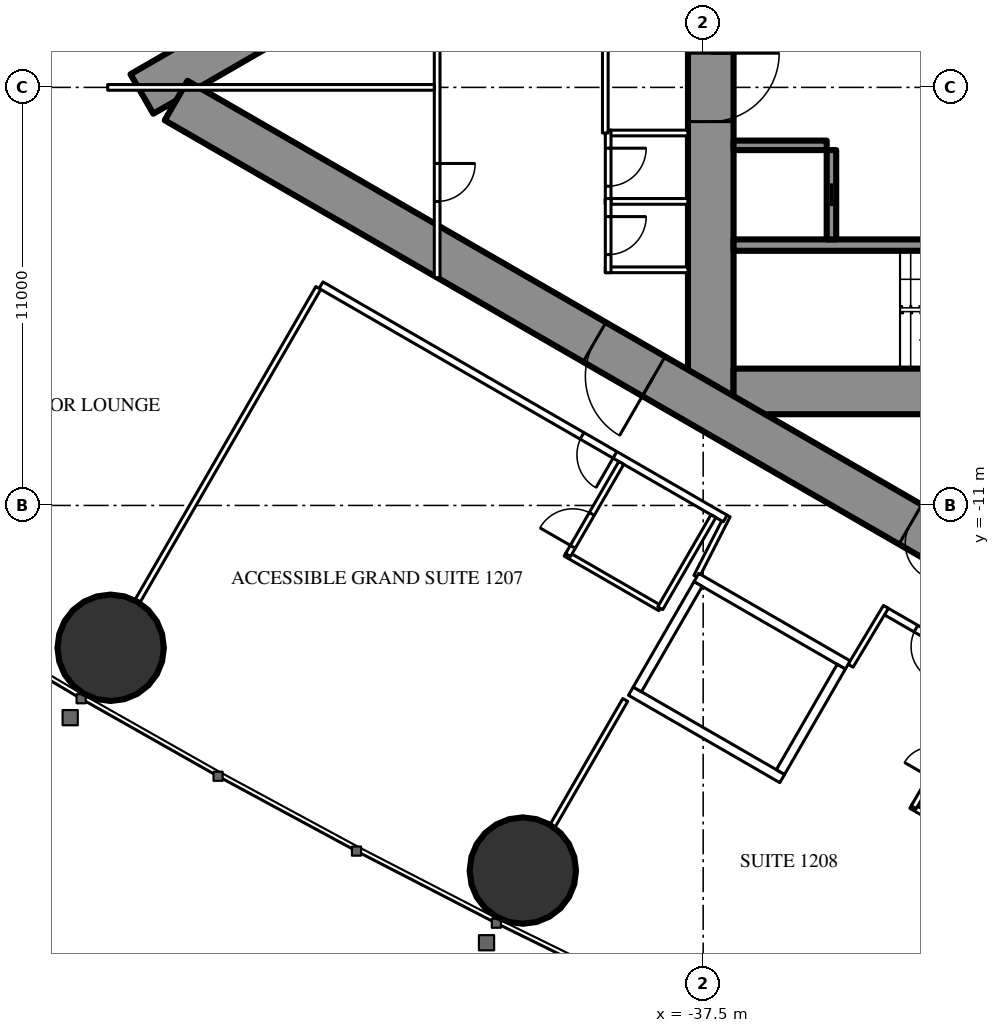
"""IFC4 building model, lengths in metres.
Left out: names, types, materials, properties, quantities, classifications, styles, units other than length and angle.
Written with IfcOpenShell. Run it as: python <this file> out.ifc"""

import sys

from ifc_helpers import new_model, si_unit, direction, frame, frame_2d, origin, origin_2d, place, context, subcontext, project, spatial, rectangle, hollow_circle, extrude, element, fill, save


model = new_model("IFC4")
c1 = context("Model", 3, precision=1e-05, world=origin(), true_north=direction((0.0, 1.0)))
c2 = subcontext(c1, "Body", "Model", "MODEL_VIEW")
j1 = project(units=[si_unit("LENGTHUNIT", "METRE"), si_unit("PLANEANGLEUNIT", "RADIAN")], contexts=[c1])
p1 = place(None, origin())
s1 = spatial("IfcSite", under=j1, at=p1, CompositionType="ELEMENT")
p2 = place(p1, origin())
s2 = spatial("IfcBuilding", under=s1, at=p2, CompositionType="ELEMENT")
p3 = place(p2, frame((0.0, 0.0, 49.5)))
s3 = spatial("IfcBuildingStorey", under=s2, at=p3, CompositionType="ELEMENT", Elevation=49.5)
for number, where, z_axis, x_axis in (
    (1, (-53.09, -14.745, 0.0), (0.0, 0.0, 1.0), (1.0, 0.0, 0.0)),
    (2, (-42.245, -20.607, 0.0), (0.0, 0.0, 1.0), (1.0, 0.0, 0.0)),
):
    element("IfcColumn", number, at=place(p3, frame(where, z_axis=z_axis, x_axis=x_axis)), inside=s3, PredefinedType="COLUMN", context=c2, shape_type="SweptSolid", body=[
        extrude(hollow_circle(Radius=1.4, WallThickness=0.12, at=origin_2d()), origin(), (0.0, 0.0, 1.0), 3.5),
    ])
p4 = place(p3, frame((-37.3, 8.6, 0.0), z_axis=(0.0, 0.0, 1.0), x_axis=(0.0, -1.0, 0.0)))
e3 = element("IfcWall", 3, at=p4, inside=s3, PredefinedType="SHEAR", context=c2, shape_type="SweptSolid", body=[
    extrude(rectangle(XDim=17.2, YDim=1.2, at=frame_2d((8.6, 0.0))), origin(), (0.0, 0.0, 1.0), 3.5),
])
p5 = place(p4, frame((7.7, 0.0, 0.0)))
e4 = element("IfcOpeningElement", 4, at=p5, cuts=e3, PredefinedType="OPENING", context=c2, shape_type="SweptSolid", body=[
    extrude(rectangle(XDim=1.8, YDim=2.2, at=frame_2d((0.9, 1.1))), frame((0.0, 0.61, 0.0), z_axis=(0.0, -1.0, 0.0), x_axis=(1.0, 0.0, 0.0)), (0.0, 0.0, 1.0), 1.22),
])
p6 = place(p3, frame((-28.3, -8.0, 0.0), z_axis=(0.0, 0.0, 1.0), x_axis=(-1.0, 0.0, 0.0)))
e5 = element("IfcWall", 5, at=p6, inside=s3, PredefinedType="SHEAR", context=c2, shape_type="SweptSolid", body=[
    extrude(rectangle(XDim=8.4, YDim=1.2, at=frame_2d((4.2, 0.0))), origin(), (0.0, 0.0, 1.0), 3.5),
])
p7 = place(p6, frame((0.25, 0.0, 0.0)))
e6 = element("IfcOpeningElement", 6, at=p7, cuts=e5, PredefinedType="OPENING", context=c2, shape_type="SweptSolid", body=[
    extrude(rectangle(XDim=1.0, YDim=2.2, at=frame_2d((0.5, 1.1))), frame((0.0, 0.61, 0.0), z_axis=(0.0, -1.0, 0.0), x_axis=(1.0, 0.0, 0.0)), (0.0, 0.0, 1.0), 1.22),
])
p8 = place(p3, frame((-28.3, -4.15, 0.0), z_axis=(0.0, 0.0, 1.0), x_axis=(-1.0, 0.0, 0.0)))
e7 = element("IfcWall", 7, at=p8, inside=s3, PredefinedType="SHEAR", context=c2, shape_type="SweptSolid", body=[
    extrude(rectangle(XDim=8.4, YDim=0.3, at=frame_2d((4.2, 0.0))), origin(), (0.0, 0.0, 1.0), 3.5),
])
p9 = place(p3, frame((-34.125, -1.65, 0.0), z_axis=(0.0, 0.0, 1.0), x_axis=(0.0, -1.0, 0.0)))
e8 = element("IfcWall", 8, at=p9, inside=s3, PredefinedType="SHEAR", context=c2, shape_type="SweptSolid", body=[
    extrude(rectangle(XDim=2.35, YDim=0.25, at=frame_2d((1.175, 0.0))), origin(), (0.0, 0.0, 1.0), 3.5),
])
p10 = place(p9, frame((0.875, 0.0, 0.0)))
e9 = element("IfcOpeningElement", 9, at=p10, cuts=e8, PredefinedType="OPENING", context=c2, shape_type="SweptSolid", body=[
    extrude(rectangle(XDim=0.6, YDim=2.0, at=frame_2d((0.3, 1.0))), frame((0.0, 0.135, 0.0), z_axis=(0.0, -1.0, 0.0), x_axis=(1.0, 0.0, 0.0)), (0.0, 0.0, 1.0), 0.27),
])
p11 = place(p3, frame((-34.25, -1.525, 0.0), z_axis=(0.0, 0.0, 1.0), x_axis=(-1.0, 0.0, 0.0)))
e10 = element("IfcWall", 10, at=p11, inside=s3, PredefinedType="SHEAR", context=c2, shape_type="SweptSolid", body=[
    extrude(rectangle(XDim=2.45, YDim=0.25, at=frame_2d((1.225, 0.0))), origin(), (0.0, 0.0, 1.0), 3.5),
])
p12 = place(p3, frame((-27.2, 14.3, 0.0), z_axis=(0.0, 0.0, 1.0), x_axis=(-0.866026593062, -0.499997940104, 0.0)))
e11 = element("IfcWall", 11, at=p12, inside=s3, PredefinedType="SHEAR", context=c2, shape_type="SweptSolid", body=[
    extrude(rectangle(XDim=28.946, YDim=1.2, at=frame_2d((14.473, 0.0))), origin(), (0.0, 0.0, 1.0), 3.5),
])
p13 = place(p12, frame((4.6, 0.0, 0.0)))
e12 = element("IfcOpeningElement", 12, at=p13, cuts=e11, PredefinedType="OPENING", context=c2, shape_type="SweptSolid", body=[
    extrude(rectangle(XDim=1.0, YDim=2.2, at=frame_2d((0.5, 1.1))), frame((0.0, 0.61, 0.0), z_axis=(0.0, -1.0, 0.0), x_axis=(1.0, 0.0, 0.0)), (0.0, 0.0, 1.0), 1.22),
])
p14 = place(p12, frame((13.395, 0.0, 0.0)))
e13 = element("IfcOpeningElement", 13, at=p14, cuts=e11, PredefinedType="OPENING", context=c2, shape_type="SweptSolid", body=[
    extrude(rectangle(XDim=1.8, YDim=2.2, at=frame_2d((0.9, 1.1))), frame((0.0, 0.61, 0.0), z_axis=(0.0, -1.0, 0.0), x_axis=(1.0, 0.0, 0.0)), (0.0, 0.0, 1.0), 1.22),
])
p15 = place(p3, frame((-27.2, -14.3, 0.0), z_axis=(0.0, 0.0, 1.0), x_axis=(-0.866024021859, 0.500002393557, 0.0)))
e14 = element("IfcWall", 14, at=p15, inside=s3, PredefinedType="SHEAR", context=c2, shape_type="SweptSolid", body=[
    extrude(rectangle(XDim=27.907, YDim=1.2, at=frame_2d((13.954, 0.0))), origin(), (0.0, 0.0, 1.0), 3.5),
])
p16 = place(p15, frame((4.6, 0.0, 0.0)))
e15 = element("IfcOpeningElement", 15, at=p16, cuts=e14, PredefinedType="OPENING", context=c2, shape_type="SweptSolid", body=[
    extrude(rectangle(XDim=1.0, YDim=2.2, at=frame_2d((0.5, 1.1))), frame((0.0, 0.61, 0.0), z_axis=(0.0, -1.0, 0.0), x_axis=(1.0, 0.0, 0.0)), (0.0, 0.0, 1.0), 1.22),
])
p17 = place(p15, frame((13.395, 0.0, 0.0)))
e16 = element("IfcOpeningElement", 16, at=p17, cuts=e14, PredefinedType="OPENING", context=c2, shape_type="SweptSolid", body=[
    extrude(rectangle(XDim=1.8, YDim=2.2, at=frame_2d((0.9, 1.1))), frame((0.0, 0.61, 0.0), z_axis=(0.0, -1.0, 0.0), x_axis=(1.0, 0.0, 0.0)), (0.0, 0.0, 1.0), 1.22),
])
p18 = place(p3, frame((-47.627, -5.278, 0.0), z_axis=(0.0, 0.0, 1.0), x_axis=(-0.500009844318, -0.86601972009, 0.0)))
e17 = element("IfcWall", 17, at=p18, inside=s3, PredefinedType="PARTITIONING", context=c2, shape_type="SweptSolid", body=[
    extrude(rectangle(XDim=9.51, YDim=0.15, at=frame_2d((4.755, 0.0))), origin(), (0.0, 0.0, 1.0), 2.25),
])
p19 = place(p3, frame((-39.551, -16.118, 0.0), z_axis=(0.0, 0.0, 1.0), x_axis=(-0.499986503906, -0.866033195618, 0.0)))
e18 = element("IfcWall", 18, at=p19, inside=s3, PredefinedType="PARTITIONING", context=c2, shape_type="SweptSolid", body=[
    extrude(rectangle(XDim=3.815, YDim=0.15, at=frame_2d((1.907, 0.0))), origin(), (0.0, 0.0, 1.0), 3.25),
])
p20 = place(p3, frame((-37.7, 10.894, 0.0), z_axis=(0.0, 0.0, 1.0), x_axis=(-0.866027905338, -0.499995667157, 0.0)))
e19 = element("IfcWall", 19, at=p20, inside=s3, PredefinedType="PARTITIONING", context=c2, shape_type="SweptSolid", body=[
    extrude(rectangle(XDim=21.787, YDim=0.2, at=frame_2d((10.894, 0.0))), origin(), (0.0, 0.0, 1.0), 3.25),
])
p21 = place(p20, frame((20.237, 0.0, 0.0)))
e20 = element("IfcOpeningElement", 20, at=p21, cuts=e19, PredefinedType="OPENING", context=c2, shape_type="SweptSolid", body=[
    extrude(rectangle(XDim=0.95, YDim=2.2, at=frame_2d((0.475, 1.1))), frame((0.0, 0.11, 0.0), z_axis=(0.0, -1.0, 0.0), x_axis=(1.0, 0.0, 0.0)), (0.0, 0.0, 1.0), 0.22),
])
p22 = place(p20, frame((2.95, 0.0, 0.0)))
e21 = element("IfcOpeningElement", 21, at=p22, cuts=e19, PredefinedType="OPENING", context=c2, shape_type="SweptSolid", body=[
    extrude(rectangle(XDim=0.95, YDim=2.2, at=frame_2d((0.475, 1.1))), frame((0.0, 0.11, 0.0), z_axis=(0.0, -1.0, 0.0), x_axis=(1.0, 0.0, 0.0)), (0.0, 0.0, 1.0), 0.22),
])
p23 = place(p3, frame((-27.572, -16.741, 0.0), z_axis=(0.0, 0.0, 1.0), x_axis=(-0.866024464444, 0.500001626982, 0.0)))
e22 = element("IfcWall", 22, at=p23, inside=s3, PredefinedType="PARTITIONING", context=c2, shape_type="SweptSolid", body=[
    extrude(rectangle(XDim=5.955, YDim=0.2, at=frame_2d((2.978, 0.0))), origin(), (0.0, 0.0, 1.0), 3.25),
])
p24 = place(p23, frame((4.05, 0.0, 0.0)))
e23 = element("IfcOpeningElement", 23, at=p24, cuts=e22, PredefinedType="OPENING", context=c2, shape_type="SweptSolid", body=[
    extrude(rectangle(XDim=0.95, YDim=2.2, at=frame_2d((0.475, 1.1))), frame((0.0, 0.11, 0.0), z_axis=(0.0, -1.0, 0.0), x_axis=(1.0, 0.0, 0.0)), (0.0, 0.0, 1.0), 0.22),
])
p25 = place(p3, frame((-36.857, -11.265, 0.0), z_axis=(0.0, 0.0, 1.0), x_axis=(-0.454225294761, -0.890886851176, 0.0)))
e24 = element("IfcWall", 24, at=p25, inside=s3, PredefinedType="PARTITIONING", context=c2, shape_type="SweptSolid", body=[
    extrude(rectangle(XDim=1.807, YDim=0.15, at=frame_2d((0.904, 0.0))), origin(), (0.0, 0.0, 1.0), 3.25),
])
p26 = place(p3, frame((-33.621, -15.218, 0.0), z_axis=(0.0, 0.0, 1.0), x_axis=(0.514336634837, 0.857588377991, 0.0)))
e25 = element("IfcWall", 25, at=p26, inside=s3, PredefinedType="PARTITIONING", context=c2, shape_type="SweptSolid", body=[
    extrude(rectangle(XDim=1.805, YDim=0.15, at=frame_2d((0.903, 0.0))), origin(), (0.0, 0.0, 1.0), 3.25),
])
p27 = place(p3, frame((-36.92, -11.344, 0.0), z_axis=(0.0, 0.0, 1.0), x_axis=(-0.866025017052, 0.500000669839, 0.0)))
e26 = element("IfcWall", 26, at=p27, inside=s3, PredefinedType="PARTITIONING", context=c2, shape_type="SweptSolid", body=[
    extrude(rectangle(XDim=12.28, YDim=0.2, at=frame_2d((6.14, 0.0))), origin(), (0.0, 0.0, 1.0), 3.25),
])
p28 = place(p27, frame((3.35, 0.0, 0.0)))
e27 = element("IfcOpeningElement", 27, at=p28, cuts=e26, PredefinedType="OPENING", context=c2, shape_type="SweptSolid", body=[
    extrude(rectangle(XDim=1.0, YDim=2.2, at=frame_2d((0.5, 1.1))), frame((0.0, 0.11, 0.0), z_axis=(0.0, -1.0, 0.0), x_axis=(1.0, 0.0, 0.0)), (0.0, 0.0, 1.0), 0.22),
])
p29 = place(p3, frame((-38.63, -13.705, 0.0), z_axis=(0.0, 0.0, 1.0), x_axis=(-0.866018712932, 0.500011588718, 0.0)))
e28 = element("IfcWall", 28, at=p29, inside=s3, PredefinedType="PARTITIONING", context=c2, shape_type="SweptSolid", body=[
    extrude(rectangle(XDim=2.875, YDim=0.15, at=frame_2d((1.438, 0.0))), origin(), (0.0, 0.0, 1.0), 3.25),
])
p30 = place(p3, frame((-39.655, -9.88, 0.0), z_axis=(0.0, 0.0, 1.0), x_axis=(-0.500049511043, -0.865996816683, 0.0)))
e29 = element("IfcWall", 29, at=p30, inside=s3, PredefinedType="PARTITIONING", context=c2, shape_type="SweptSolid", body=[
    extrude(rectangle(XDim=2.8, YDim=0.15, at=frame_2d((1.4, 0.0))), origin(), (0.0, 0.0, 1.0), 3.25),
])
p31 = place(p30, frame((1.55, 0.0, 0.0)))
e30 = element("IfcOpeningElement", 30, at=p31, cuts=e29, PredefinedType="OPENING", context=c2, shape_type="SweptSolid", body=[
    extrude(rectangle(XDim=1.0, YDim=2.2, at=frame_2d((0.5, 1.1))), frame((0.0, 0.085, 0.0), z_axis=(0.0, -1.0, 0.0), x_axis=(1.0, 0.0, 0.0)), (0.0, 0.0, 1.0), 0.17),
])
p32 = place(p3, frame((-37.23, -11.281, 0.0), z_axis=(0.0, 0.0, 1.0), x_axis=(-0.500049511043, -0.865996816683, 0.0)))
e31 = element("IfcWall", 31, at=p32, inside=s3, PredefinedType="PARTITIONING", context=c2, shape_type="SweptSolid", body=[
    extrude(rectangle(XDim=2.8, YDim=0.15, at=frame_2d((1.4, 0.0))), origin(), (0.0, 0.0, 1.0), 3.25),
])
p33 = place(p3, frame((-29.882, -20.142, 0.0), z_axis=(0.0, 0.0, 1.0), x_axis=(-0.866031185235, 0.4999899861, 0.0)))
e32 = element("IfcWall", 32, at=p33, inside=s3, PredefinedType="PARTITIONING", context=c2, shape_type="SweptSolid", body=[
    extrude(rectangle(XDim=2.475, YDim=0.15, at=frame_2d((1.238, 0.0))), origin(), (0.0, 0.0, 1.0), 3.25),
])
p34 = place(p3, frame((-30.66, -16.69, 0.0), z_axis=(0.0, 0.0, 1.0), x_axis=(-0.499936506574, -0.866062058628, 0.0)))
e33 = element("IfcWall", 33, at=p34, inside=s3, PredefinedType="PARTITIONING", context=c2, shape_type="SweptSolid", body=[
    extrude(rectangle(XDim=2.6, YDim=0.15, at=frame_2d((1.3, 0.0))), origin(), (0.0, 0.0, 1.0), 3.25),
])
p35 = place(p34, frame((0.9, 0.0, 0.0)))
e34 = element("IfcOpeningElement", 34, at=p35, cuts=e33, PredefinedType="OPENING", context=c2, shape_type="SweptSolid", body=[
    extrude(rectangle(XDim=0.8, YDim=2.2, at=frame_2d((0.4, 1.1))), frame((0.0, 0.085, 0.0), z_axis=(0.0, -1.0, 0.0), x_axis=(1.0, 0.0, 0.0)), (0.0, 0.0, 1.0), 0.17),
])
for number, where, z_axis, x_axis in (
    (35, (-37.9, -1.2, 0.0), (0.0, 0.0, 1.0), (-1.0, 0.0, 0.0)),
    (36, (-37.9, -3.0, 0.0), (0.0, 0.0, 1.0), (-1.0, 0.0, 0.0)),
    (37, (-37.9, -4.8, 0.0), (0.0, 0.0, 1.0), (-1.0, 0.0, 0.0)),
):
    element("IfcWall", number, at=place(p3, frame(where, z_axis=z_axis, x_axis=x_axis)), inside=s3, PredefinedType="PARTITIONING", context=c2, shape_type="SweptSolid", body=[
        extrude(rectangle(XDim=2.175, YDim=0.15, at=frame_2d((1.087, 0.0))), origin(), (0.0, 0.0, 1.0), 3.25),
    ])
p36 = place(p3, frame((-40.0, -1.125, 0.0), z_axis=(0.0, 0.0, 1.0), x_axis=(0.0, -1.0, 0.0)))
e38 = element("IfcWall", 38, at=p36, inside=s3, PredefinedType="PARTITIONING", context=c2, shape_type="SweptSolid", body=[
    extrude(rectangle(XDim=1.95, YDim=0.15, at=frame_2d((0.975, 0.0))), origin(), (0.0, 0.0, 1.0), 3.25),
])
p37 = place(p36, frame((0.475, 0.0, 0.0)))
e39 = element("IfcOpeningElement", 39, at=p37, cuts=e38, PredefinedType="OPENING", context=c2, shape_type="SweptSolid", body=[
    extrude(rectangle(XDim=1.0, YDim=2.2, at=frame_2d((0.5, 1.1))), frame((0.0, 0.085, 0.0), z_axis=(0.0, -1.0, 0.0), x_axis=(1.0, 0.0, 0.0)), (0.0, 0.0, 1.0), 0.17),
])
p38 = place(p3, frame((-40.0, -2.925, 0.0), z_axis=(0.0, 0.0, 1.0), x_axis=(0.0, -1.0, 0.0)))
e40 = element("IfcWall", 40, at=p38, inside=s3, PredefinedType="PARTITIONING", context=c2, shape_type="SweptSolid", body=[
    extrude(rectangle(XDim=1.95, YDim=0.15, at=frame_2d((0.975, 0.0))), origin(), (0.0, 0.0, 1.0), 3.25),
])
p39 = place(p38, frame((0.475, 0.0, 0.0)))
e41 = element("IfcOpeningElement", 41, at=p39, cuts=e40, PredefinedType="OPENING", context=c2, shape_type="SweptSolid", body=[
    extrude(rectangle(XDim=1.0, YDim=2.2, at=frame_2d((0.5, 1.1))), frame((0.0, 0.085, 0.0), z_axis=(0.0, -1.0, 0.0), x_axis=(1.0, 0.0, 0.0)), (0.0, 0.0, 1.0), 0.17),
])
p40 = place(p3, frame((-40.075, 6.174, 0.0), z_axis=(0.0, 0.0, 1.0), x_axis=(0.0, -1.0, 0.0)))
e42 = element("IfcWall", 42, at=p40, inside=s3, PredefinedType="PARTITIONING", context=c2, shape_type="SweptSolid", body=[
    extrude(rectangle(XDim=7.374, YDim=0.15, at=frame_2d((3.687, 0.0))), origin(), (0.0, 0.0, 1.0), 3.25),
])
p41 = place(p40, frame((2.787, 0.0, 0.0)))
e43 = element("IfcOpeningElement", 43, at=p41, cuts=e42, PredefinedType="OPENING", context=c2, shape_type="SweptSolid", body=[
    extrude(rectangle(XDim=1.8, YDim=2.2, at=frame_2d((0.9, 1.1))), frame((0.0, 0.085, 0.0), z_axis=(0.0, -1.0, 0.0), x_axis=(1.0, 0.0, 0.0)), (0.0, 0.0, 1.0), 0.17),
])
p42 = place(p3, frame((-44.5, 5.005, 0.0), z_axis=(0.0, 0.0, 1.0), x_axis=(0.0, -1.0, 0.0)))
e44 = element("IfcWall", 44, at=p42, inside=s3, PredefinedType="PARTITIONING", context=c2, shape_type="SweptSolid", body=[
    extrude(rectangle(XDim=10.009, YDim=0.15, at=frame_2d((5.005, 0.0))), origin(), (0.0, 0.0, 1.0), 2.45),
])
p43 = place(p42, frame((2.002, 0.0, 0.0)))
e45 = element("IfcOpeningElement", 45, at=p43, cuts=e44, PredefinedType="OPENING", context=c2, shape_type="SweptSolid", body=[
    extrude(rectangle(XDim=1.0, YDim=2.2, at=frame_2d((0.5, 1.1))), frame((0.0, 0.085, 0.0), z_axis=(0.0, -1.0, 0.0), x_axis=(1.0, 0.0, 0.0)), (0.0, 0.0, 1.0), 0.17),
])
p44 = place(p42, frame((7.007, 0.0, 0.0)))
e46 = element("IfcOpeningElement", 46, at=p44, cuts=e44, PredefinedType="OPENING", context=c2, shape_type="SweptSolid", body=[
    extrude(rectangle(XDim=1.0, YDim=2.2, at=frame_2d((0.5, 1.1))), frame((0.0, 0.085, 0.0), z_axis=(0.0, -1.0, 0.0), x_axis=(1.0, 0.0, 0.0)), (0.0, 0.0, 1.0), 0.17),
])
p45 = place(p3, frame((-44.575, 0.0, 0.0), z_axis=(0.0, 0.0, 1.0), x_axis=(-1.0, 0.0, 0.0)))
e47 = element("IfcWall", 47, at=p45, inside=s3, PredefinedType="PARTITIONING", context=c2, shape_type="SweptSolid", body=[
    extrude(rectangle(XDim=8.593, YDim=0.15, at=frame_2d((4.297, 0.0))), origin(), (0.0, 0.0, 1.0), 2.25),
])
p46 = place(p3, frame((-33.696, -15.197, 0.0), z_axis=(0.0, 0.0, 1.0), x_axis=(-0.865976953817, 0.500083908417, 0.0)))
e48 = element("IfcWall", 48, at=p46, inside=s3, PredefinedType="PARTITIONING", context=c2, shape_type="SweptSolid", body=[
    extrude(rectangle(XDim=4.599, YDim=0.25, at=frame_2d((2.3, 0.0))), origin(), (0.0, 0.0, 1.0), 3.25),
])
p47 = place(p3, frame((-35.42, -18.186, 0.0), z_axis=(0.0, 0.0, 1.0), x_axis=(-0.865990227814, 0.50006092162, 0.0)))
e49 = element("IfcWall", 49, at=p47, inside=s3, PredefinedType="PARTITIONING", context=c2, shape_type="SweptSolid", body=[
    extrude(rectangle(XDim=4.6, YDim=0.25, at=frame_2d((2.3, 0.0))), origin(), (0.0, 0.0, 1.0), 3.25),
])
p48 = place(p3, frame((-33.866, -15.243, 0.0), z_axis=(0.0, 0.0, 1.0), x_axis=(-0.499929347863, -0.866066190972, 0.0)))
e50 = element("IfcWall", 50, at=p48, inside=s3, PredefinedType="PARTITIONING", context=c2, shape_type="SweptSolid", body=[
    extrude(rectangle(XDim=3.201, YDim=0.25, at=frame_2d((1.6, 0.0))), origin(), (0.0, 0.0, 1.0), 3.25),
])
p49 = place(p3, frame((-37.633, -13.068, 0.0), z_axis=(0.0, 0.0, 1.0), x_axis=(-0.499872130319, -0.866099216793, 0.0)))
e51 = element("IfcWall", 51, at=p49, inside=s3, PredefinedType="PARTITIONING", context=c2, shape_type="SweptSolid", body=[
    extrude(rectangle(XDim=3.2, YDim=0.25, at=frame_2d((1.6, 0.0))), origin(), (0.0, 0.0, 1.0), 3.25),
])
p50 = place(p31, origin())
e52 = element("IfcDoor", 52, at=p50, inside=s3, OperationType="SINGLE_SWING_RIGHT", PredefinedType="DOOR", context=c2, shape_type="SweptSolid", body=[
    extrude(rectangle(XDim=1.0, YDim=2.2, at=frame_2d((0.5, 1.1))), frame((0.0, 0.025, 0.0), z_axis=(0.0, -1.0, 0.0), x_axis=(1.0, 0.0, 0.0)), (0.0, 0.0, 1.0), 0.05),
])
fill(e30, e52)
p51 = place(p28, origin())
e53 = element("IfcDoor", 53, at=p51, inside=s3, OperationType="SINGLE_SWING_LEFT", PredefinedType="DOOR", context=c2, shape_type="SweptSolid", body=[
    extrude(rectangle(XDim=1.0, YDim=2.2, at=frame_2d((0.5, 1.1))), frame((0.0, 0.025, 0.0), z_axis=(0.0, -1.0, 0.0), x_axis=(1.0, 0.0, 0.0)), (0.0, 0.0, 1.0), 0.05),
])
fill(e27, e53)
p52 = place(p24, origin())
e54 = element("IfcDoor", 54, at=p52, inside=s3, OperationType="SINGLE_SWING_LEFT", PredefinedType="DOOR", context=c2, shape_type="SweptSolid", body=[
    extrude(rectangle(XDim=0.95, YDim=2.2, at=frame_2d((0.475, 1.1))), frame((0.0, 0.025, 0.0), z_axis=(0.0, -1.0, 0.0), x_axis=(1.0, 0.0, 0.0)), (0.0, 0.0, 1.0), 0.05),
])
fill(e23, e54)
p53 = place(p37, origin())
e55 = element("IfcDoor", 55, at=p53, inside=s3, OperationType="SINGLE_SWING_LEFT", PredefinedType="DOOR", context=c2, shape_type="SweptSolid", body=[
    extrude(rectangle(XDim=1.0, YDim=2.2, at=frame_2d((0.5, 1.1))), frame((0.0, 0.025, 0.0), z_axis=(0.0, -1.0, 0.0), x_axis=(1.0, 0.0, 0.0)), (0.0, 0.0, 1.0), 0.05),
])
fill(e39, e55)
p54 = place(p39, origin())
e56 = element("IfcDoor", 56, at=p54, inside=s3, OperationType="SINGLE_SWING_LEFT", PredefinedType="DOOR", context=c2, shape_type="SweptSolid", body=[
    extrude(rectangle(XDim=1.0, YDim=2.2, at=frame_2d((0.5, 1.1))), frame((0.0, 0.025, 0.0), z_axis=(0.0, -1.0, 0.0), x_axis=(1.0, 0.0, 0.0)), (0.0, 0.0, 1.0), 0.05),
])
fill(e41, e56)
p55 = place(p44, origin())
e57 = element("IfcDoor", 57, at=p55, inside=s3, OperationType="SINGLE_SWING_LEFT", PredefinedType="DOOR", context=c2, shape_type="SweptSolid", body=[
    extrude(rectangle(XDim=1.0, YDim=2.2, at=frame_2d((0.5, 1.1))), frame((0.0, 0.025, 0.0), z_axis=(0.0, -1.0, 0.0), x_axis=(1.0, 0.0, 0.0)), (0.0, 0.0, 1.0), 0.05),
])
fill(e46, e57)
p56 = place(p16, origin())
e58 = element("IfcDoor", 58, at=p56, inside=s3, OperationType="SINGLE_SWING_LEFT", PredefinedType="DOOR", context=c2, shape_type="SweptSolid", body=[
    extrude(rectangle(XDim=1.0, YDim=2.2, at=frame_2d((0.5, 1.1))), frame((0.0, 0.025, 0.0), z_axis=(0.0, -1.0, 0.0), x_axis=(1.0, 0.0, 0.0)), (0.0, 0.0, 1.0), 0.05),
])
fill(e15, e58)
p57 = place(p17, origin())
e59 = element("IfcDoor", 59, at=p57, inside=s3, OperationType="DOUBLE_DOOR_SINGLE_SWING", PredefinedType="DOOR", context=c2, shape_type="SweptSolid", body=[
    extrude(rectangle(XDim=1.8, YDim=2.2, at=frame_2d((0.9, 1.1))), frame((0.0, 0.025, 0.0), z_axis=(0.0, -1.0, 0.0), x_axis=(1.0, 0.0, 0.0)), (0.0, 0.0, 1.0), 0.05),
])
fill(e16, e59)
p58 = place(p5, origin())
e60 = element("IfcDoor", 60, at=p58, inside=s3, OperationType="DOUBLE_DOOR_SINGLE_SWING", PredefinedType="DOOR", context=c2, shape_type="SweptSolid", body=[
    extrude(rectangle(XDim=1.8, YDim=2.2, at=frame_2d((0.9, 1.1))), frame((0.0, 0.025, 0.0), z_axis=(0.0, -1.0, 0.0), x_axis=(1.0, 0.0, 0.0)), (0.0, 0.0, 1.0), 0.05),
])
fill(e4, e60)
p59 = place(p10, origin())
e61 = element("IfcDoor", 61, at=p59, inside=s3, OperationType="SLIDING_TO_LEFT", PredefinedType="DOOR", context=c2, shape_type="SweptSolid", body=[
    extrude(rectangle(XDim=0.6, YDim=2.0, at=frame_2d((0.3, 1.0))), frame((0.0, 0.025, 0.0), z_axis=(0.0, -1.0, 0.0), x_axis=(1.0, 0.0, 0.0)), (0.0, 0.0, 1.0), 0.05),
])
fill(e9, e61)
save(model, sys.argv[1])
